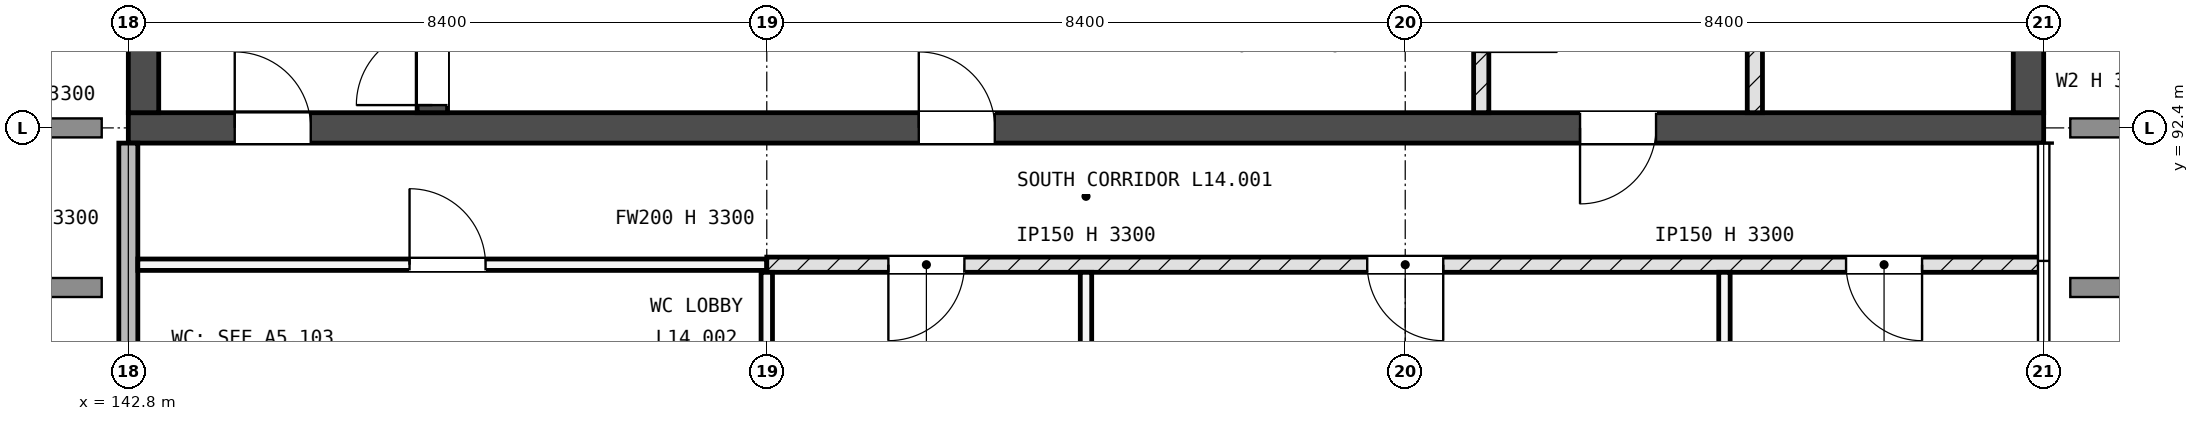
"""IFC4 building model, lengths in metres.
Left out: names, types, materials, properties, quantities, classifications, styles, units other than length and angle.
Written with IfcOpenShell. Run it as: python <this file> out.ifc"""

import sys

from ifc_helpers import new_model, si_unit, direction, frame, frame_2d, origin, place, context, subcontext, project, spatial, rectangle, extrude, element, fill, save


model = new_model("IFC4")
c1 = context("Model", 3, precision=1e-05, world=origin(), true_north=direction((0.0, 1.0)))
c2 = subcontext(c1, "Body", "Model", "MODEL_VIEW")
j1 = project(units=[si_unit("LENGTHUNIT", "METRE"), si_unit("PLANEANGLEUNIT", "RADIAN")], contexts=[c1])
p1 = place(None, origin())
s1 = spatial("IfcSite", under=j1, at=p1, CompositionType="ELEMENT")
p2 = place(p1, origin())
s2 = spatial("IfcBuilding", under=s1, at=p2, CompositionType="ELEMENT")
p3 = place(p2, frame((0.0, 0.0, 54.0)))
s3 = spatial("IfcBuildingStorey", under=s2, at=p3, CompositionType="ELEMENT", Elevation=54.0)
p4 = place(p3, frame((142.8, 92.4, -0.3), z_axis=(0.0, 0.0, 1.0), x_axis=(1.0, 0.0, 0.0)))
e1 = element("IfcWall", 1, at=p4, inside=s3, PredefinedType="SHEAR", context=c2, shape_type="SweptSolid", body=[
    extrude(rectangle(XDim=25.2, YDim=0.4, at=frame_2d((12.6, 0.0))), origin(), (0.0, 0.0, 1.0), 3.6),
])
p5 = place(p4, frame((1.4, 0.0, 0.3)))
e2 = element("IfcOpeningElement", 2, at=p5, cuts=e1, PredefinedType="OPENING", context=c2, shape_type="SweptSolid", body=[
    extrude(rectangle(XDim=1.0, YDim=2.1, at=frame_2d((0.5, 1.05))), frame((0.0, 0.21, 0.0), z_axis=(0.0, -1.0, 0.0), x_axis=(1.0, 0.0, 0.0)), (0.0, 0.0, 1.0), 0.42),
])
p6 = place(p4, frame((19.1, 0.0, 0.3)))
e3 = element("IfcOpeningElement", 3, at=p6, cuts=e1, PredefinedType="OPENING", context=c2, shape_type="SweptSolid", body=[
    extrude(rectangle(XDim=1.0, YDim=2.1, at=frame_2d((0.5, 1.05))), frame((0.0, 0.21, 0.0), z_axis=(0.0, -1.0, 0.0), x_axis=(1.0, 0.0, 0.0)), (0.0, 0.0, 1.0), 0.42),
])
p7 = place(p4, frame((10.4, 0.0, 0.3)))
e4 = element("IfcOpeningElement", 4, at=p7, cuts=e1, PredefinedType="OPENING", context=c2, shape_type="SweptSolid", body=[
    extrude(rectangle(XDim=1.0, YDim=2.1, at=frame_2d((0.5, 1.05))), frame((0.0, 0.21, 0.0), z_axis=(0.0, -1.0, 0.0), x_axis=(1.0, 0.0, 0.0)), (0.0, 0.0, 1.0), 0.42),
])
p8 = place(p3, frame((143.0, 92.6, -0.3), z_axis=(0.0, 0.0, 1.0), x_axis=(0.0, 1.0, 0.0)))
e5 = element("IfcWall", 5, at=p8, inside=s3, PredefinedType="SHEAR", context=c2, shape_type="SweptSolid", body=[
    extrude(rectangle(XDim=16.4, YDim=0.4, at=frame_2d((8.2, 0.0))), origin(), (0.0, 0.0, 1.0), 3.6),
])
p9 = place(p8, frame((3.0, 0.0, 1.9)))
e6 = element("IfcOpeningElement", 6, at=p9, cuts=e5, PredefinedType="OPENING", context=c2, shape_type="SweptSolid", body=[
    extrude(rectangle(XDim=1.2, YDim=0.9, at=frame_2d((0.6, 0.45))), frame((0.0, 0.21, 0.0), z_axis=(0.0, -1.0, 0.0), x_axis=(1.0, 0.0, 0.0)), (0.0, 0.0, 1.0), 0.42),
])
p10 = place(p3, frame((167.8, 92.6, -0.3), z_axis=(0.0, 0.0, 1.0), x_axis=(0.0, 1.0, 0.0)))
e7 = element("IfcWall", 7, at=p10, inside=s3, PredefinedType="SHEAR", context=c2, shape_type="SweptSolid", body=[
    extrude(rectangle(XDim=16.4, YDim=0.4, at=frame_2d((8.2, 0.0))), origin(), (0.0, 0.0, 1.0), 3.6),
])
p11 = place(p10, frame((12.2, 0.0, 1.9)))
e8 = element("IfcOpeningElement", 8, at=p11, cuts=e7, PredefinedType="OPENING", context=c2, shape_type="SweptSolid", body=[
    extrude(rectangle(XDim=1.2, YDim=0.9, at=frame_2d((0.6, 0.45))), frame((0.0, 0.21, 0.0), z_axis=(0.0, -1.0, 0.0), x_axis=(1.0, 0.0, 0.0)), (0.0, 0.0, 1.0), 0.42),
])
p12 = place(p3, frame((146.8, 92.6, -0.3), z_axis=(0.0, 0.0, 1.0), x_axis=(0.0, 1.0, 0.0)))
e9 = element("IfcWall", 9, at=p12, inside=s3, PredefinedType="SHEAR", context=c2, shape_type="SweptSolid", body=[
    extrude(rectangle(XDim=7.525, YDim=0.4, at=frame_2d((3.762, 0.0))), origin(), (0.0, 0.0, 1.0), 3.6),
])
p13 = place(p12, frame((0.1, 0.0, 0.3)))
e10 = element("IfcOpeningElement", 10, at=p13, cuts=e9, PredefinedType="OPENING", context=c2, shape_type="SweptSolid", body=[
    extrude(rectangle(XDim=1.0, YDim=2.1, at=frame_2d((0.5, 1.05))), frame((0.0, 0.21, 0.0), z_axis=(0.0, -1.0, 0.0), x_axis=(1.0, 0.0, 0.0)), (0.0, 0.0, 1.0), 0.42),
])
p14 = place(p3, frame((142.8, 84.35, 0.0), z_axis=(0.0, 0.0, 1.0), x_axis=(0.0, 1.0, 0.0)))
e11 = element("IfcWall", 11, at=p14, inside=s3, PredefinedType="STANDARD", context=c2, shape_type="SweptSolid", body=[
    extrude(rectangle(XDim=7.85, YDim=0.25, at=frame_2d((3.925, 0.0))), origin(), (0.0, 0.0, 1.0), 3.3),
])
p15 = place(p14, frame((2.35, 0.0, 2.1)))
e12 = element("IfcOpeningElement", 12, at=p15, cuts=e11, PredefinedType="OPENING", context=c2, shape_type="SweptSolid", body=[
    extrude(rectangle(XDim=0.9, YDim=0.6, at=frame_2d((0.45, 0.3))), frame((0.0, 0.135, 0.0), z_axis=(0.0, -1.0, 0.0), x_axis=(1.0, 0.0, 0.0)), (0.0, 0.0, 1.0), 0.27),
])
p16 = place(p3, frame((142.925, 90.6, 0.0), z_axis=(0.0, 0.0, 1.0), x_axis=(1.0, 0.0, 0.0)))
e13 = element("IfcWall", 13, at=p16, inside=s3, PredefinedType="PARTITIONING", context=c2, shape_type="SweptSolid", body=[
    extrude(rectangle(XDim=8.275, YDim=0.15, at=frame_2d((4.137, 0.0))), origin(), (0.0, 0.0, 1.0), 3.3),
])
p17 = place(p16, frame((3.575, 0.0, 0.0)))
e14 = element("IfcOpeningElement", 14, at=p17, cuts=e13, PredefinedType="OPENING", context=c2, shape_type="SweptSolid", body=[
    extrude(rectangle(XDim=1.0, YDim=2.1, at=frame_2d((0.5, 1.05))), frame((0.0, 0.085, 0.0), z_axis=(0.0, -1.0, 0.0), x_axis=(1.0, 0.0, 0.0)), (0.0, 0.0, 1.0), 0.17),
])
p18 = place(p3, frame((151.2, 90.6, 0.0), z_axis=(0.0, 0.0, 1.0), x_axis=(1.0, 0.0, 0.0)))
e15 = element("IfcWall", 15, at=p18, inside=s3, PredefinedType="SOLIDWALL", context=c2, shape_type="SweptSolid", body=[
    extrude(rectangle(XDim=16.8, YDim=0.2, at=frame_2d((8.4, 0.0))), origin(), (0.0, 0.0, 1.0), 3.3),
])
p19 = place(p18, frame((1.6, 0.0, 0.0)))
e16 = element("IfcOpeningElement", 16, at=p19, cuts=e15, PredefinedType="OPENING", context=c2, shape_type="SweptSolid", body=[
    extrude(rectangle(XDim=1.0, YDim=2.1, at=frame_2d((0.5, 1.05))), frame((0.0, 0.11, 0.0), z_axis=(0.0, -1.0, 0.0), x_axis=(1.0, 0.0, 0.0)), (0.0, 0.0, 1.0), 0.22),
])
p20 = place(p18, frame((7.9, 0.0, 0.0)))
e17 = element("IfcOpeningElement", 17, at=p20, cuts=e15, PredefinedType="OPENING", context=c2, shape_type="SweptSolid", body=[
    extrude(rectangle(XDim=1.0, YDim=2.1, at=frame_2d((0.5, 1.05))), frame((0.0, 0.11, 0.0), z_axis=(0.0, -1.0, 0.0), x_axis=(1.0, 0.0, 0.0)), (0.0, 0.0, 1.0), 0.22),
])
p21 = place(p18, frame((14.2, 0.0, 0.0)))
e18 = element("IfcOpeningElement", 18, at=p21, cuts=e15, PredefinedType="OPENING", context=c2, shape_type="SweptSolid", body=[
    extrude(rectangle(XDim=1.0, YDim=2.1, at=frame_2d((0.5, 1.05))), frame((0.0, 0.11, 0.0), z_axis=(0.0, -1.0, 0.0), x_axis=(1.0, 0.0, 0.0)), (0.0, 0.0, 1.0), 0.22),
])
p22 = place(p3, frame((151.2, 84.0, 0.0), z_axis=(0.0, 0.0, 1.0), x_axis=(0.0, 1.0, 0.0)))
e19 = element("IfcWall", 19, at=p22, inside=s3, PredefinedType="PARTITIONING", context=c2, shape_type="SweptSolid", body=[
    extrude(rectangle(XDim=6.5, YDim=0.15, at=frame_2d((3.25, 0.0))), origin(), (0.0, 0.0, 1.0), 2.6),
])
p23 = place(p3, frame((155.4, 84.0, 0.0), z_axis=(0.0, 0.0, 1.0), x_axis=(0.0, 1.0, 0.0)))
e20 = element("IfcWall", 20, at=p23, inside=s3, PredefinedType="PARTITIONING", context=c2, shape_type="SweptSolid", body=[
    extrude(rectangle(XDim=6.5, YDim=0.15, at=frame_2d((3.25, 0.0))), origin(), (0.0, 0.0, 1.0), 3.3),
])
p24 = place(p3, frame((160.6, 92.6, 0.0), z_axis=(0.0, 0.0, 1.0), x_axis=(0.0, 1.0, 0.0)))
e21 = element("IfcWall", 21, at=p24, inside=s3, PredefinedType="SOLIDWALL", context=c2, shape_type="SweptSolid", body=[
    extrude(rectangle(XDim=12.5, YDim=0.2, at=frame_2d((6.25, 0.0))), origin(), (0.0, 0.0, 1.0), 3.3),
])
p25 = place(p24, frame((5.1, 0.0, 0.0)))
e22 = element("IfcOpeningElement", 22, at=p25, cuts=e21, PredefinedType="OPENING", context=c2, shape_type="SweptSolid", body=[
    extrude(rectangle(XDim=0.8, YDim=2.1, at=frame_2d((0.4, 1.05))), frame((0.0, 0.11, 0.0), z_axis=(0.0, -1.0, 0.0), x_axis=(1.0, 0.0, 0.0)), (0.0, 0.0, 1.0), 0.22),
])
p26 = place(p24, frame((0.8, 0.0, 0.0)))
e23 = element("IfcOpeningElement", 23, at=p26, cuts=e21, PredefinedType="OPENING", context=c2, shape_type="SweptSolid", body=[
    extrude(rectangle(XDim=1.0, YDim=2.1, at=frame_2d((0.5, 1.05))), frame((0.0, 0.11, 0.0), z_axis=(0.0, -1.0, 0.0), x_axis=(1.0, 0.0, 0.0)), (0.0, 0.0, 1.0), 0.22),
])
p27 = place(p3, frame((163.8, 84.0, 0.0), z_axis=(0.0, 0.0, 1.0), x_axis=(0.0, 1.0, 0.0)))
e24 = element("IfcWall", 24, at=p27, inside=s3, PredefinedType="PARTITIONING", context=c2, shape_type="SweptSolid", body=[
    extrude(rectangle(XDim=6.5, YDim=0.15, at=frame_2d((3.25, 0.0))), origin(), (0.0, 0.0, 1.0), 3.3),
])
p28 = place(p3, frame((164.2, 92.6, 0.0), z_axis=(0.0, 0.0, 1.0), x_axis=(0.0, 1.0, 0.0)))
e25 = element("IfcWall", 25, at=p28, inside=s3, PredefinedType="SOLIDWALL", context=c2, shape_type="SweptSolid", body=[
    extrude(rectangle(XDim=8.75, YDim=0.2, at=frame_2d((4.375, 0.0))), origin(), (0.0, 0.0, 1.0), 3.3),
])
p29 = place(p28, frame((1.7, 0.0, 0.0)))
e26 = element("IfcOpeningElement", 26, at=p29, cuts=e25, PredefinedType="OPENING", context=c2, shape_type="SweptSolid", body=[
    extrude(rectangle(XDim=0.8, YDim=2.1, at=frame_2d((0.4, 1.05))), frame((0.0, 0.11, 0.0), z_axis=(0.0, -1.0, 0.0), x_axis=(1.0, 0.0, 0.0)), (0.0, 0.0, 1.0), 0.22),
])
p30 = place(p28, frame((6.3, 0.0, 0.0)))
e27 = element("IfcOpeningElement", 27, at=p30, cuts=e25, PredefinedType="OPENING", context=c2, shape_type="SweptSolid", body=[
    extrude(rectangle(XDim=0.8, YDim=2.1, at=frame_2d((0.4, 1.05))), frame((0.0, 0.11, 0.0), z_axis=(0.0, -1.0, 0.0), x_axis=(1.0, 0.0, 0.0)), (0.0, 0.0, 1.0), 0.22),
])
p31 = place(p5, origin())
e28 = element("IfcDoor", 28, at=p31, inside=s3, OperationType="SINGLE_SWING_RIGHT", PredefinedType="DOOR", context=c2, shape_type="SweptSolid", body=[
    extrude(rectangle(XDim=1.0, YDim=2.1, at=frame_2d((0.5, 1.05))), frame((0.0, 0.025, 0.0), z_axis=(0.0, -1.0, 0.0), x_axis=(1.0, 0.0, 0.0)), (0.0, 0.0, 1.0), 0.05),
])
fill(e2, e28)
p32 = place(p13, origin())
e29 = element("IfcDoor", 29, at=p32, inside=s3, OperationType="SINGLE_SWING_RIGHT", PredefinedType="DOOR", context=c2, shape_type="SweptSolid", body=[
    extrude(rectangle(XDim=1.0, YDim=2.1, at=frame_2d((0.5, 1.05))), frame((0.0, 0.025, 0.0), z_axis=(0.0, -1.0, 0.0), x_axis=(1.0, 0.0, 0.0)), (0.0, 0.0, 1.0), 0.05),
])
fill(e10, e29)
p33 = place(p19, origin())
e30 = element("IfcDoor", 30, at=p33, inside=s3, OperationType="SINGLE_SWING_LEFT", PredefinedType="DOOR", context=c2, shape_type="SweptSolid", body=[
    extrude(rectangle(XDim=1.0, YDim=2.1, at=frame_2d((0.5, 1.05))), frame((0.0, 0.025, 0.0), z_axis=(0.0, -1.0, 0.0), x_axis=(1.0, 0.0, 0.0)), (0.0, 0.0, 1.0), 0.05),
])
fill(e16, e30)
p34 = place(p20, origin())
e31 = element("IfcDoor", 31, at=p34, inside=s3, OperationType="SINGLE_SWING_RIGHT", PredefinedType="DOOR", context=c2, shape_type="SweptSolid", body=[
    extrude(rectangle(XDim=1.0, YDim=2.1, at=frame_2d((0.5, 1.05))), frame((0.0, 0.025, 0.0), z_axis=(0.0, -1.0, 0.0), x_axis=(1.0, 0.0, 0.0)), (0.0, 0.0, 1.0), 0.05),
])
fill(e17, e31)
p35 = place(p21, origin())
e32 = element("IfcDoor", 32, at=p35, inside=s3, OperationType="SINGLE_SWING_RIGHT", PredefinedType="DOOR", context=c2, shape_type="SweptSolid", body=[
    extrude(rectangle(XDim=1.0, YDim=2.1, at=frame_2d((0.5, 1.05))), frame((0.0, 0.025, 0.0), z_axis=(0.0, -1.0, 0.0), x_axis=(1.0, 0.0, 0.0)), (0.0, 0.0, 1.0), 0.05),
])
fill(e18, e32)
p36 = place(p17, origin())
e33 = element("IfcDoor", 33, at=p36, inside=s3, OperationType="SINGLE_SWING_RIGHT", PredefinedType="DOOR", context=c2, shape_type="SweptSolid", body=[
    extrude(rectangle(XDim=1.0, YDim=2.1, at=frame_2d((0.5, 1.05))), frame((0.0, 0.025, 0.0), z_axis=(0.0, -1.0, 0.0), x_axis=(1.0, 0.0, 0.0)), (0.0, 0.0, 1.0), 0.05),
])
fill(e14, e33)
p37 = place(p6, origin())
e34 = element("IfcDoor", 34, at=p37, inside=s3, OperationType="SINGLE_SWING_LEFT", PredefinedType="DOOR", context=c2, shape_type="SweptSolid", body=[
    extrude(rectangle(XDim=1.0, YDim=2.1, at=frame_2d((0.5, 1.05))), frame((0.0, 0.025, 0.0), z_axis=(0.0, -1.0, 0.0), x_axis=(1.0, 0.0, 0.0)), (0.0, 0.0, 1.0), 0.05),
])
fill(e3, e34)
p38 = place(p7, origin())
e35 = element("IfcDoor", 35, at=p38, inside=s3, OperationType="SINGLE_SWING_RIGHT", PredefinedType="DOOR", context=c2, shape_type="SweptSolid", body=[
    extrude(rectangle(XDim=1.0, YDim=2.1, at=frame_2d((0.5, 1.05))), frame((0.0, 0.025, 0.0), z_axis=(0.0, -1.0, 0.0), x_axis=(1.0, 0.0, 0.0)), (0.0, 0.0, 1.0), 0.05),
])
fill(e4, e35)
save(model, sys.argv[1])
